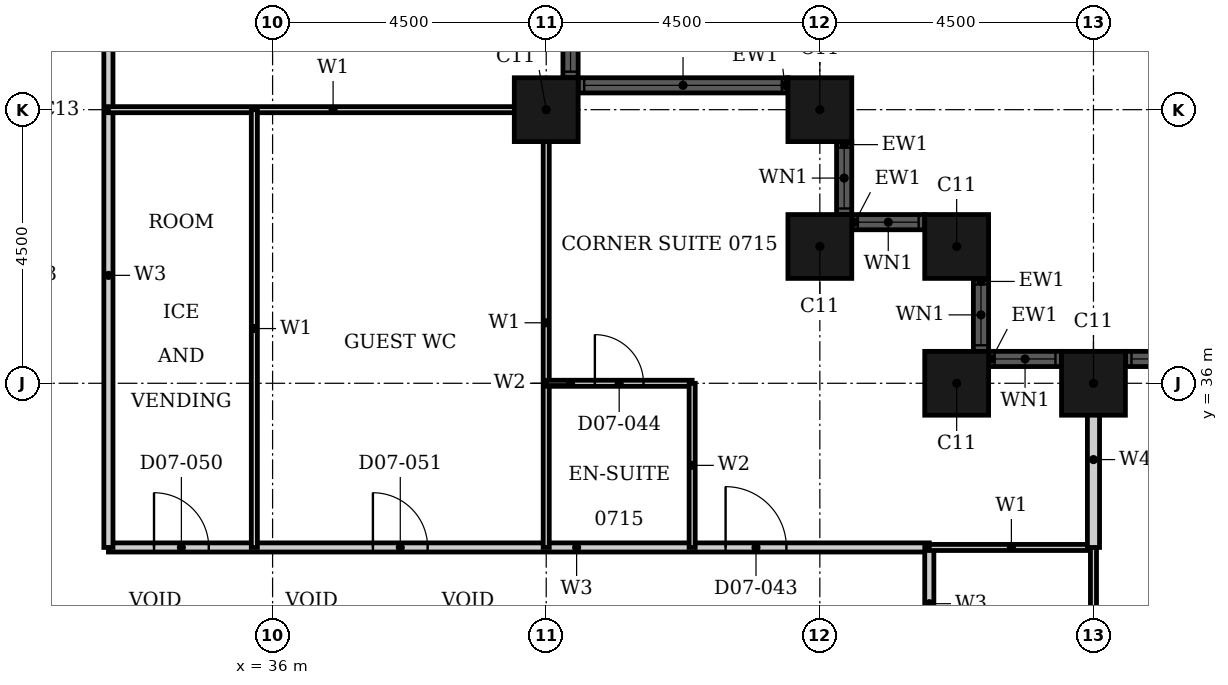
"""IFC4 building model, lengths in metres.
Left out: names, types, materials, properties, quantities, classifications, styles, units other than length and angle.
Written with IfcOpenShell. Run it as: python <this file> out.ifc"""

import sys

from ifc_helpers import new_model, si_unit, direction, frame, frame_2d, origin, origin_2d, place, context, subcontext, project, spatial, rectangle, hollow_rectangle, extrude, element, fill, save


model = new_model("IFC4")
c1 = context("Model", 3, precision=1e-05, world=origin(), true_north=direction((0.0, 1.0)))
c2 = subcontext(c1, "Body", "Model", "MODEL_VIEW")
j1 = project(units=[si_unit("LENGTHUNIT", "METRE"), si_unit("PLANEANGLEUNIT", "RADIAN")], contexts=[c1])
p1 = place(None, origin())
s1 = spatial("IfcSite", under=j1, at=p1, CompositionType="ELEMENT")
p2 = place(p1, origin())
s2 = spatial("IfcBuilding", under=s1, at=p2, CompositionType="ELEMENT")
p3 = place(p2, frame((0.0, 0.0, 37.2)))
s3 = spatial("IfcBuildingStorey", under=s2, at=p3, CompositionType="ELEMENT", Elevation=37.2)
for number, where, z_axis, x_axis in (
    (1, (49.5, 36.0, 0.0), (0.0, 0.0, 1.0), (1.0, 0.0, 0.0)),
    (2, (47.25, 36.0, 0.0), (0.0, 0.0, 1.0), (1.0, 0.0, 0.0)),
    (3, (47.25, 38.25, 0.0), (0.0, 0.0, 1.0), (1.0, 0.0, 0.0)),
    (4, (45.0, 38.25, 0.0), (0.0, 0.0, 1.0), (1.0, 0.0, 0.0)),
    (5, (45.0, 40.5, 0.0), (0.0, 0.0, 1.0), (1.0, 0.0, 0.0)),
    (6, (40.5, 40.5, 0.0), (0.0, 0.0, 1.0), (1.0, 0.0, 0.0)),
):
    element("IfcColumn", number, at=place(p3, frame(where, z_axis=z_axis, x_axis=x_axis)), inside=s3, PredefinedType="COLUMN", context=c2, shape_type="SweptSolid", body=[
        extrude(hollow_rectangle(XDim=1.05, YDim=1.05, WallThickness=0.034, at=origin_2d()), origin(), (0.0, 0.0, 1.0), 3.6),
    ])
p4 = place(p3, frame((57.975, 36.4, 0.0), z_axis=(0.0, 0.0, 1.0), x_axis=(-1.0, 0.0, 0.0)))
e7 = element("IfcWall", 7, at=p4, inside=s3, PredefinedType="SOLIDWALL", context=c2, shape_type="SweptSolid", body=[
    extrude(rectangle(XDim=7.95, YDim=0.25, at=frame_2d((3.975, 0.0))), origin(), (0.0, 0.0, 1.0), 3.6),
])
p5 = place(p4, frame((0.1, 0.0, 0.9)))
e8 = element("IfcOpeningElement", 8, at=p5, cuts=e7, PredefinedType="OPENING", context=c2, shape_type="SweptSolid", body=[
    extrude(rectangle(XDim=3.25, YDim=2.08, at=frame_2d((1.625, 1.04))), frame((0.0, 0.135, 0.0), z_axis=(0.0, -1.0, 0.0), x_axis=(1.0, 0.0, 0.0)), (0.0, 0.0, 1.0), 0.27),
])
p6 = place(p4, frame((4.6, 0.0, 0.9)))
e9 = element("IfcOpeningElement", 9, at=p6, cuts=e7, PredefinedType="OPENING", context=c2, shape_type="SweptSolid", body=[
    extrude(rectangle(XDim=3.25, YDim=2.08, at=frame_2d((1.625, 1.04))), frame((0.0, 0.135, 0.0), z_axis=(0.0, -1.0, 0.0), x_axis=(1.0, 0.0, 0.0)), (0.0, 0.0, 1.0), 0.27),
])
p7 = place(p3, frame((48.975, 36.4, 0.0), z_axis=(0.0, 0.0, 1.0), x_axis=(-1.0, 0.0, 0.0)))
e10 = element("IfcWall", 10, at=p7, inside=s3, PredefinedType="SOLIDWALL", context=c2, shape_type="SweptSolid", body=[
    extrude(rectangle(XDim=1.2, YDim=0.25, at=frame_2d((0.6, 0.0))), origin(), (0.0, 0.0, 1.0), 3.6),
])
p8 = place(p7, frame((0.1, 0.0, 0.9)))
e11 = element("IfcOpeningElement", 11, at=p8, cuts=e10, PredefinedType="OPENING", context=c2, shape_type="SweptSolid", body=[
    extrude(rectangle(XDim=1.0, YDim=2.08, at=frame_2d((0.5, 1.04))), frame((0.0, 0.135, 0.0), z_axis=(0.0, -1.0, 0.0), x_axis=(1.0, 0.0, 0.0)), (0.0, 0.0, 1.0), 0.27),
])
p9 = place(p3, frame((47.65, 36.525, 0.0), z_axis=(0.0, 0.0, 1.0), x_axis=(0.0, 1.0, 0.0)))
e12 = element("IfcWall", 12, at=p9, inside=s3, PredefinedType="SOLIDWALL", context=c2, shape_type="SweptSolid", body=[
    extrude(rectangle(XDim=1.2, YDim=0.25, at=frame_2d((0.6, 0.0))), origin(), (0.0, 0.0, 1.0), 3.6),
])
p10 = place(p9, frame((0.1, 0.0, 0.9)))
e13 = element("IfcOpeningElement", 13, at=p10, cuts=e12, PredefinedType="OPENING", context=c2, shape_type="SweptSolid", body=[
    extrude(rectangle(XDim=1.0, YDim=2.08, at=frame_2d((0.5, 1.04))), frame((0.0, 0.135, 0.0), z_axis=(0.0, -1.0, 0.0), x_axis=(1.0, 0.0, 0.0)), (0.0, 0.0, 1.0), 0.27),
])
p11 = place(p3, frame((46.725, 38.65, 0.0), z_axis=(0.0, 0.0, 1.0), x_axis=(-1.0, 0.0, 0.0)))
e14 = element("IfcWall", 14, at=p11, inside=s3, PredefinedType="SOLIDWALL", context=c2, shape_type="SweptSolid", body=[
    extrude(rectangle(XDim=1.2, YDim=0.25, at=frame_2d((0.6, 0.0))), origin(), (0.0, 0.0, 1.0), 3.6),
])
p12 = place(p11, frame((0.1, 0.0, 0.9)))
e15 = element("IfcOpeningElement", 15, at=p12, cuts=e14, PredefinedType="OPENING", context=c2, shape_type="SweptSolid", body=[
    extrude(rectangle(XDim=1.0, YDim=2.08, at=frame_2d((0.5, 1.04))), frame((0.0, 0.135, 0.0), z_axis=(0.0, -1.0, 0.0), x_axis=(1.0, 0.0, 0.0)), (0.0, 0.0, 1.0), 0.27),
])
p13 = place(p3, frame((45.4, 38.775, 0.0), z_axis=(0.0, 0.0, 1.0), x_axis=(0.0, 1.0, 0.0)))
e16 = element("IfcWall", 16, at=p13, inside=s3, PredefinedType="SOLIDWALL", context=c2, shape_type="SweptSolid", body=[
    extrude(rectangle(XDim=1.2, YDim=0.25, at=frame_2d((0.6, 0.0))), origin(), (0.0, 0.0, 1.0), 3.6),
])
p14 = place(p13, frame((0.1, 0.0, 0.9)))
e17 = element("IfcOpeningElement", 17, at=p14, cuts=e16, PredefinedType="OPENING", context=c2, shape_type="SweptSolid", body=[
    extrude(rectangle(XDim=1.0, YDim=2.08, at=frame_2d((0.5, 1.04))), frame((0.0, 0.135, 0.0), z_axis=(0.0, -1.0, 0.0), x_axis=(1.0, 0.0, 0.0)), (0.0, 0.0, 1.0), 0.27),
])
p15 = place(p3, frame((44.475, 40.9, 0.0), z_axis=(0.0, 0.0, 1.0), x_axis=(-1.0, 0.0, 0.0)))
e18 = element("IfcWall", 18, at=p15, inside=s3, PredefinedType="SOLIDWALL", context=c2, shape_type="SweptSolid", body=[
    extrude(rectangle(XDim=3.45, YDim=0.25, at=frame_2d((1.725, 0.0))), origin(), (0.0, 0.0, 1.0), 3.6),
])
p16 = place(p15, frame((0.1, 0.0, 0.9)))
e19 = element("IfcOpeningElement", 19, at=p16, cuts=e18, PredefinedType="OPENING", context=c2, shape_type="SweptSolid", body=[
    extrude(rectangle(XDim=3.25, YDim=2.08, at=frame_2d((1.625, 1.04))), frame((0.0, 0.135, 0.0), z_axis=(0.0, -1.0, 0.0), x_axis=(1.0, 0.0, 0.0)), (0.0, 0.0, 1.0), 0.27),
])
p17 = place(p3, frame((40.9, 41.025, 0.0), z_axis=(0.0, 0.0, 1.0), x_axis=(0.0, 1.0, 0.0)))
e20 = element("IfcWall", 20, at=p17, inside=s3, PredefinedType="SOLIDWALL", context=c2, shape_type="SweptSolid", body=[
    extrude(rectangle(XDim=7.95, YDim=0.25, at=frame_2d((3.975, 0.0))), origin(), (0.0, 0.0, 1.0), 3.6),
])
p18 = place(p17, frame((0.1, 0.0, 0.9)))
e21 = element("IfcOpeningElement", 21, at=p18, cuts=e20, PredefinedType="OPENING", context=c2, shape_type="SweptSolid", body=[
    extrude(rectangle(XDim=3.25, YDim=2.08, at=frame_2d((1.625, 1.04))), frame((0.0, 0.135, 0.0), z_axis=(0.0, -1.0, 0.0), x_axis=(1.0, 0.0, 0.0)), (0.0, 0.0, 1.0), 0.27),
])
p19 = place(p17, frame((4.6, 0.0, 0.9)))
e22 = element("IfcOpeningElement", 22, at=p19, cuts=e20, PredefinedType="OPENING", context=c2, shape_type="SweptSolid", body=[
    extrude(rectangle(XDim=3.25, YDim=2.08, at=frame_2d((1.625, 1.04))), frame((0.0, 0.135, 0.0), z_axis=(0.0, -1.0, 0.0), x_axis=(1.0, 0.0, 0.0)), (0.0, 0.0, 1.0), 0.27),
])
p20 = place(p3, frame((33.3, 33.3, 0.0), z_axis=(0.0, 0.0, 1.0), x_axis=(1.0, 0.0, 0.0)))
e23 = element("IfcWall", 23, at=p20, inside=s3, PredefinedType="PARTITIONING", context=c2, shape_type="SweptSolid", body=[
    extrude(rectangle(XDim=13.5, YDim=0.15, at=frame_2d((6.75, 0.0))), origin(), (0.0, 0.0, 1.0), 3.3),
])
p21 = place(p20, frame((10.15, 0.0, 0.0)))
e24 = element("IfcOpeningElement", 24, at=p21, cuts=e23, PredefinedType="OPENING", context=c2, shape_type="SweptSolid", body=[
    extrude(rectangle(XDim=1.0, YDim=2.1, at=frame_2d((0.5, 1.05))), frame((0.0, 0.085, 0.0), z_axis=(0.0, -1.0, 0.0), x_axis=(1.0, 0.0, 0.0)), (0.0, 0.0, 1.0), 0.17),
])
p22 = place(p20, frame((0.75, 0.0, 0.0)))
e25 = element("IfcOpeningElement", 25, at=p22, cuts=e23, PredefinedType="OPENING", context=c2, shape_type="SweptSolid", body=[
    extrude(rectangle(XDim=0.9, YDim=2.1, at=frame_2d((0.45, 1.05))), frame((0.0, 0.085, 0.0), z_axis=(0.0, -1.0, 0.0), x_axis=(1.0, 0.0, 0.0)), (0.0, 0.0, 1.0), 0.17),
])
p23 = place(p20, frame((4.35, 0.0, 0.0)))
e26 = element("IfcOpeningElement", 26, at=p23, cuts=e23, PredefinedType="OPENING", context=c2, shape_type="SweptSolid", body=[
    extrude(rectangle(XDim=0.9, YDim=2.1, at=frame_2d((0.45, 1.05))), frame((0.0, 0.085, 0.0), z_axis=(0.0, -1.0, 0.0), x_axis=(1.0, 0.0, 0.0)), (0.0, 0.0, 1.0), 0.17),
])
p24 = place(p3, frame((33.3, 33.3, 0.0), z_axis=(0.0, 0.0, 1.0), x_axis=(0.0, 1.0, 0.0)))
e27 = element("IfcWall", 27, at=p24, inside=s3, PredefinedType="PARTITIONING", context=c2, shape_type="SweptSolid", body=[
    extrude(rectangle(XDim=16.2, YDim=0.15, at=frame_2d((8.1, 0.0))), origin(), (0.0, 0.0, 1.0), 3.3),
])
p25 = place(p24, frame((8.95, 0.0, 0.0)))
e28 = element("IfcOpeningElement", 28, at=p25, cuts=e27, PredefinedType="OPENING", context=c2, shape_type="SweptSolid", body=[
    extrude(rectangle(XDim=1.0, YDim=2.1, at=frame_2d((0.5, 1.05))), frame((0.0, 0.085, 0.0), z_axis=(0.0, -1.0, 0.0), x_axis=(1.0, 0.0, 0.0)), (0.0, 0.0, 1.0), 0.17),
])
p26 = place(p3, frame((46.8, 28.8, 0.0), z_axis=(0.0, 0.0, 1.0), x_axis=(0.0, 1.0, 0.0)))
e29 = element("IfcWall", 29, at=p26, inside=s3, PredefinedType="PARTITIONING", context=c2, shape_type="SweptSolid", body=[
    extrude(rectangle(XDim=4.5, YDim=0.15, at=frame_2d((2.25, 0.0))), origin(), (0.0, 0.0, 1.0), 3.3),
])
p27 = place(p26, frame((1.75, 0.0, 0.0)))
e30 = element("IfcOpeningElement", 30, at=p27, cuts=e29, PredefinedType="OPENING", context=c2, shape_type="SweptSolid", body=[
    extrude(rectangle(XDim=0.9, YDim=2.1, at=frame_2d((0.45, 1.05))), frame((0.0, 0.085, 0.0), z_axis=(0.0, -1.0, 0.0), x_axis=(1.0, 0.0, 0.0)), (0.0, 0.0, 1.0), 0.17),
])
p28 = place(p3, frame((46.8, 33.3, 0.0), z_axis=(0.0, 0.0, 1.0), x_axis=(1.0, 0.0, 0.0)))
e31 = element("IfcWall", 31, at=p28, inside=s3, PredefinedType="PARTITIONING", context=c2, shape_type="SweptSolid", body=[
    extrude(rectangle(XDim=2.7, YDim=0.1, at=frame_2d((1.35, 0.0))), origin(), (0.0, 0.0, 1.0), 3.3),
])
p29 = place(p3, frame((33.3, 40.5, 0.0), z_axis=(0.0, 0.0, 1.0), x_axis=(1.0, 0.0, 0.0)))
e32 = element("IfcWall", 32, at=p29, inside=s3, PredefinedType="PARTITIONING", context=c2, shape_type="SweptSolid", body=[
    extrude(rectangle(XDim=7.39, YDim=0.1, at=frame_2d((3.695, 0.0))), origin(), (0.0, 0.0, 1.0), 2.38),
])
p30 = place(p3, frame((35.7, 33.3, 0.0), z_axis=(0.0, 0.0, 1.0), x_axis=(0.0, 1.0, 0.0)))
e33 = element("IfcWall", 33, at=p30, inside=s3, PredefinedType="PARTITIONING", context=c2, shape_type="SweptSolid", body=[
    extrude(rectangle(XDim=7.2, YDim=0.1, at=frame_2d((3.6, 0.0))), origin(), (0.0, 0.0, 1.0), 3.3),
])
p31 = place(p3, frame((40.5, 33.3, 0.0), z_axis=(0.0, 0.0, 1.0), x_axis=(0.0, 1.0, 0.0)))
e34 = element("IfcWall", 34, at=p31, inside=s3, PredefinedType="PARTITIONING", context=c2, shape_type="SweptSolid", body=[
    extrude(rectangle(XDim=7.39, YDim=0.1, at=frame_2d((3.695, 0.0))), origin(), (0.0, 0.0, 1.0), 3.3),
])
p32 = place(p3, frame((49.5, 28.8, 0.0), z_axis=(0.0, 0.0, 1.0), x_axis=(0.0, 1.0, 0.0)))
e35 = element("IfcWall", 35, at=p32, inside=s3, PredefinedType="PARTITIONING", context=c2, shape_type="SweptSolid", body=[
    extrude(rectangle(XDim=4.5, YDim=0.1, at=frame_2d((2.25, 0.0))), origin(), (0.0, 0.0, 1.0), 2.38),
])
p33 = place(p3, frame((49.5, 33.3, 0.0), z_axis=(0.0, 0.0, 1.0), x_axis=(0.0, 1.0, 0.0)))
e36 = element("IfcWall", 36, at=p33, inside=s3, PredefinedType="PARTITIONING", context=c2, shape_type="SweptSolid", body=[
    extrude(rectangle(XDim=2.89, YDim=0.2, at=frame_2d((1.445, 0.0))), origin(), (0.0, 0.0, 1.0), 2.38),
])
p34 = place(p3, frame((40.5, 36.0, 0.0), z_axis=(0.0, 0.0, 1.0), x_axis=(1.0, 0.0, 0.0)))
e37 = element("IfcWall", 37, at=p34, inside=s3, PredefinedType="PARTITIONING", context=c2, shape_type="SweptSolid", body=[
    extrude(rectangle(XDim=2.4, YDim=0.1, at=frame_2d((1.2, 0.0))), origin(), (0.0, 0.0, 1.0), 3.3),
])
p35 = place(p34, frame((0.8, 0.0, 0.0)))
e38 = element("IfcOpeningElement", 38, at=p35, cuts=e37, PredefinedType="OPENING", context=c2, shape_type="SweptSolid", body=[
    extrude(rectangle(XDim=0.8, YDim=2.1, at=frame_2d((0.4, 1.05))), frame((0.0, 0.06, 0.0), z_axis=(0.0, -1.0, 0.0), x_axis=(1.0, 0.0, 0.0)), (0.0, 0.0, 1.0), 0.12),
])
p36 = place(p3, frame((42.9, 33.3, 0.0), z_axis=(0.0, 0.0, 1.0), x_axis=(0.0, 1.0, 0.0)))
e39 = element("IfcWall", 39, at=p36, inside=s3, PredefinedType="PARTITIONING", context=c2, shape_type="SweptSolid", body=[
    extrude(rectangle(XDim=2.7, YDim=0.1, at=frame_2d((1.35, 0.0))), origin(), (0.0, 0.0, 1.0), 3.3),
])
p37 = place(p6, origin())
e40 = element("IfcWindow", 40, at=p37, inside=s3, PartitioningType="SINGLE_PANEL", PredefinedType="WINDOW", context=c2, shape_type="SweptSolid", body=[
    extrude(rectangle(XDim=3.25, YDim=2.08, at=frame_2d((1.625, 1.04))), frame((0.0, 0.03, 0.0), z_axis=(0.0, -1.0, 0.0), x_axis=(1.0, 0.0, 0.0)), (0.0, 0.0, 1.0), 0.06),
])
fill(e9, e40)
p38 = place(p8, origin())
e41 = element("IfcWindow", 41, at=p38, inside=s3, PartitioningType="SINGLE_PANEL", PredefinedType="WINDOW", context=c2, shape_type="SweptSolid", body=[
    extrude(rectangle(XDim=1.0, YDim=2.08, at=frame_2d((0.5, 1.04))), frame((0.0, 0.03, 0.0), z_axis=(0.0, -1.0, 0.0), x_axis=(1.0, 0.0, 0.0)), (0.0, 0.0, 1.0), 0.06),
])
fill(e11, e41)
p39 = place(p10, origin())
e42 = element("IfcWindow", 42, at=p39, inside=s3, PartitioningType="SINGLE_PANEL", PredefinedType="WINDOW", context=c2, shape_type="SweptSolid", body=[
    extrude(rectangle(XDim=1.0, YDim=2.08, at=frame_2d((0.5, 1.04))), frame((0.0, 0.03, 0.0), z_axis=(0.0, -1.0, 0.0), x_axis=(1.0, 0.0, 0.0)), (0.0, 0.0, 1.0), 0.06),
])
fill(e13, e42)
p40 = place(p12, origin())
e43 = element("IfcWindow", 43, at=p40, inside=s3, PartitioningType="SINGLE_PANEL", PredefinedType="WINDOW", context=c2, shape_type="SweptSolid", body=[
    extrude(rectangle(XDim=1.0, YDim=2.08, at=frame_2d((0.5, 1.04))), frame((0.0, 0.03, 0.0), z_axis=(0.0, -1.0, 0.0), x_axis=(1.0, 0.0, 0.0)), (0.0, 0.0, 1.0), 0.06),
])
fill(e15, e43)
p41 = place(p14, origin())
e44 = element("IfcWindow", 44, at=p41, inside=s3, PartitioningType="SINGLE_PANEL", PredefinedType="WINDOW", context=c2, shape_type="SweptSolid", body=[
    extrude(rectangle(XDim=1.0, YDim=2.08, at=frame_2d((0.5, 1.04))), frame((0.0, 0.03, 0.0), z_axis=(0.0, -1.0, 0.0), x_axis=(1.0, 0.0, 0.0)), (0.0, 0.0, 1.0), 0.06),
])
fill(e17, e44)
p42 = place(p16, origin())
e45 = element("IfcWindow", 45, at=p42, inside=s3, PartitioningType="SINGLE_PANEL", PredefinedType="WINDOW", context=c2, shape_type="SweptSolid", body=[
    extrude(rectangle(XDim=3.25, YDim=2.08, at=frame_2d((1.625, 1.04))), frame((0.0, 0.03, 0.0), z_axis=(0.0, -1.0, 0.0), x_axis=(1.0, 0.0, 0.0)), (0.0, 0.0, 1.0), 0.06),
])
fill(e19, e45)
p43 = place(p18, origin())
e46 = element("IfcWindow", 46, at=p43, inside=s3, PartitioningType="SINGLE_PANEL", PredefinedType="WINDOW", context=c2, shape_type="SweptSolid", body=[
    extrude(rectangle(XDim=3.25, YDim=2.08, at=frame_2d((1.625, 1.04))), frame((0.0, 0.03, 0.0), z_axis=(0.0, -1.0, 0.0), x_axis=(1.0, 0.0, 0.0)), (0.0, 0.0, 1.0), 0.06),
])
fill(e21, e46)
p44 = place(p21, origin())
e47 = element("IfcDoor", 47, at=p44, inside=s3, OperationType="SINGLE_SWING_RIGHT", PredefinedType="DOOR", context=c2, shape_type="SweptSolid", body=[
    extrude(rectangle(XDim=1.0, YDim=2.1, at=frame_2d((0.5, 1.05))), frame((0.0, 0.025, 0.0), z_axis=(0.0, -1.0, 0.0), x_axis=(1.0, 0.0, 0.0)), (0.0, 0.0, 1.0), 0.05),
])
fill(e24, e47)
p45 = place(p35, origin())
e48 = element("IfcDoor", 48, at=p45, inside=s3, OperationType="SINGLE_SWING_LEFT", PredefinedType="DOOR", context=c2, shape_type="SweptSolid", body=[
    extrude(rectangle(XDim=0.8, YDim=2.1, at=frame_2d((0.4, 1.05))), frame((0.0, 0.025, 0.0), z_axis=(0.0, -1.0, 0.0), x_axis=(1.0, 0.0, 0.0)), (0.0, 0.0, 1.0), 0.05),
])
fill(e38, e48)
p46 = place(p22, origin())
e49 = element("IfcDoor", 49, at=p46, inside=s3, OperationType="SINGLE_SWING_RIGHT", PredefinedType="DOOR", context=c2, shape_type="SweptSolid", body=[
    extrude(rectangle(XDim=0.9, YDim=2.1, at=frame_2d((0.45, 1.05))), frame((0.0, 0.025, 0.0), z_axis=(0.0, -1.0, 0.0), x_axis=(1.0, 0.0, 0.0)), (0.0, 0.0, 1.0), 0.05),
])
fill(e25, e49)
p47 = place(p23, origin())
e50 = element("IfcDoor", 50, at=p47, inside=s3, OperationType="SINGLE_SWING_LEFT", PredefinedType="DOOR", context=c2, shape_type="SweptSolid", body=[
    extrude(rectangle(XDim=0.9, YDim=2.1, at=frame_2d((0.45, 1.05))), frame((0.0, 0.025, 0.0), z_axis=(0.0, -1.0, 0.0), x_axis=(1.0, 0.0, 0.0)), (0.0, 0.0, 1.0), 0.05),
])
fill(e26, e50)
save(model, sys.argv[1])
